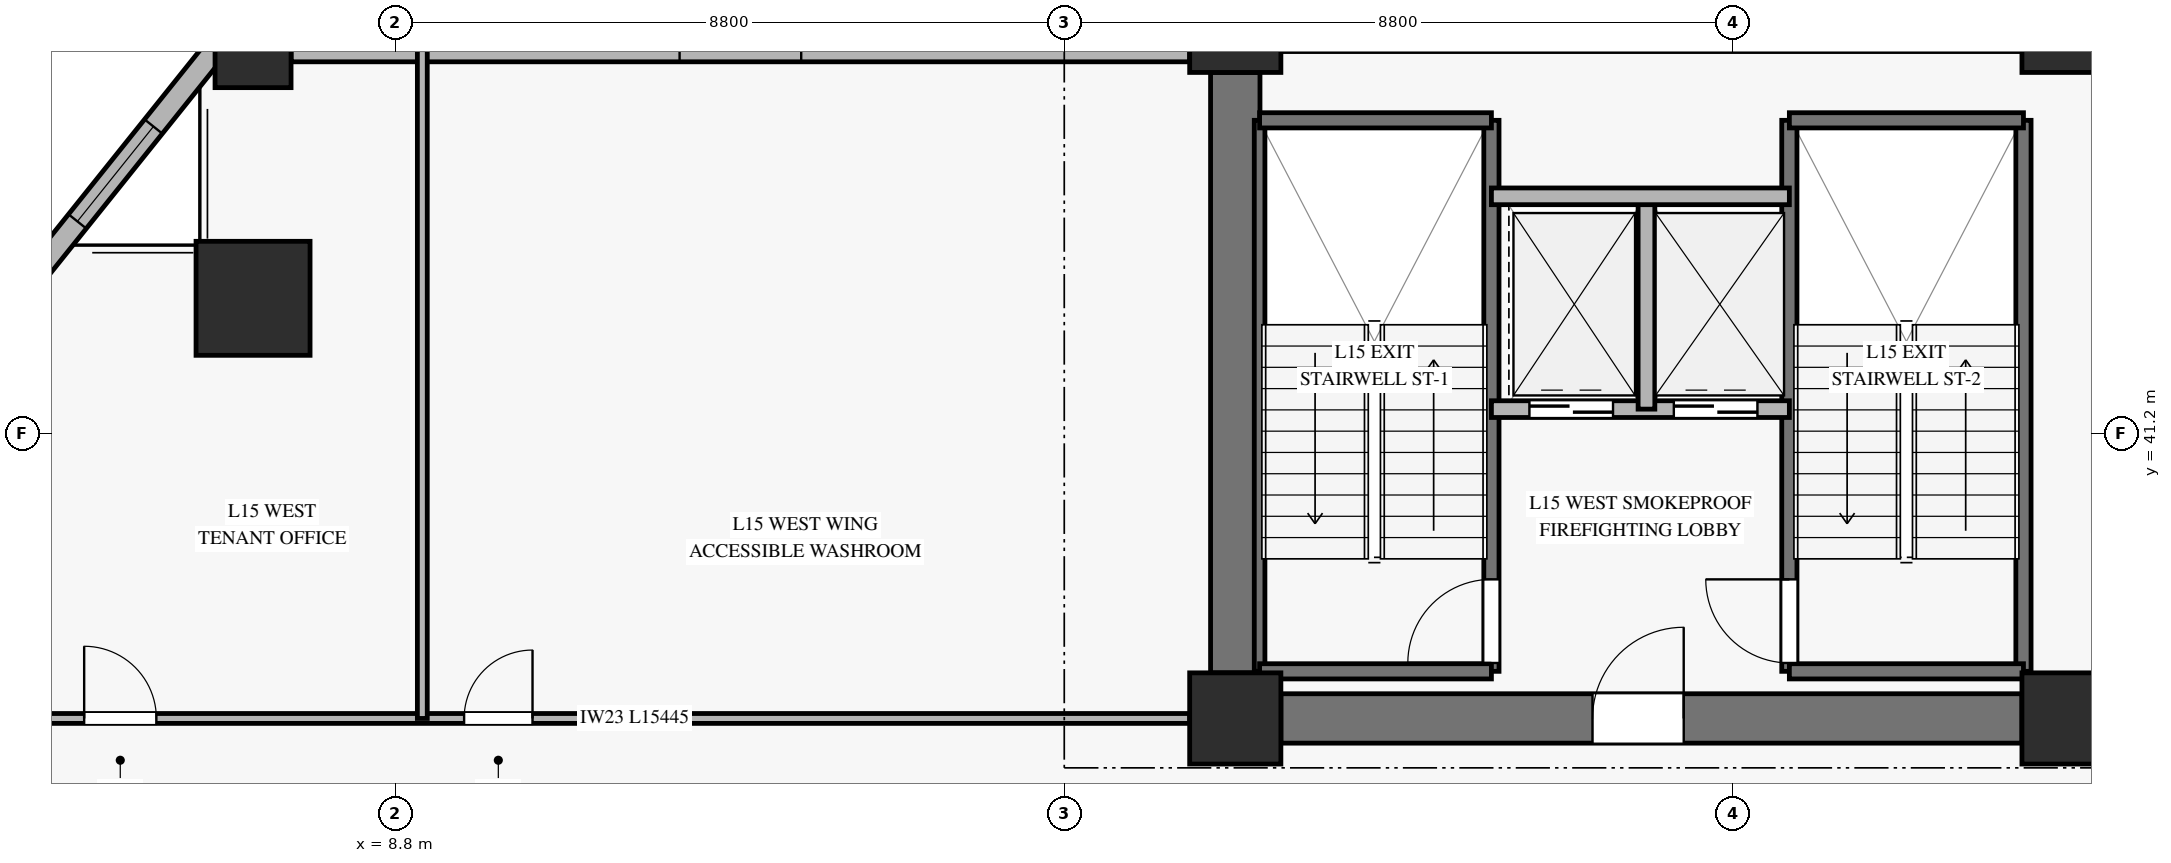
"""IFC4 building model, lengths in metres.
Left out: names, types, materials, properties, quantities, classifications, styles, units other than length and angle.
Written with IfcOpenShell. Run it as: python <this file> out.ifc"""

import sys

from ifc_helpers import new_model, si_unit, direction, frame, frame_2d, origin, origin_2d, place, context, subcontext, project, spatial, rectangle, hollow_rectangle, extrude, source, transform, mapped, element, fill, save


model = new_model("IFC4")
c1 = context("Model", 3, precision=1e-05, world=origin(), true_north=direction((0.0, 1.0)))
c2 = subcontext(c1, "Body", "Model", "MODEL_VIEW")
j1 = project(units=[si_unit("LENGTHUNIT", "METRE"), si_unit("PLANEANGLEUNIT", "RADIAN")], contexts=[c1])
p1 = place(None, origin())
s1 = spatial("IfcSite", under=j1, at=p1, CompositionType="ELEMENT")
p2 = place(p1, origin())
s2 = spatial("IfcBuilding", under=s1, at=p2, CompositionType="ELEMENT")
p3 = place(p2, frame((0.0, 0.0, 61.1)))
s3 = spatial("IfcBuildingStorey", under=s2, at=p3, CompositionType="ELEMENT", Elevation=61.1)
m1 = source(origin(), c2, "Body", "SweptSolid", [
    extrude(rectangle(XDim=1.2, YDim=1.2, at=origin_2d()), origin(), (0.0, 0.0, 1.0), 3.68),
])
for number, where, z_axis, x_axis in (
    (1, (19.85, 37.45, 0.0), (0.0, 0.0, 1.0), (1.0, 0.0, 0.0)),
    (2, (19.85, 46.55, 0.0), (0.0, 0.0, 1.0), (1.0, 0.0, 0.0)),
    (3, (30.8, 37.45, 0.0), (0.0, 0.0, 1.0), (1.0, 0.0, 0.0)),
    (4, (30.8, 46.55, 0.0), (0.0, 0.0, 1.0), (1.0, 0.0, 0.0)),
):
    element("IfcColumn", number, at=place(p3, frame(where, z_axis=z_axis, x_axis=x_axis)), inside=s3, PredefinedType="PILASTER", context=c2, shape_type="MappedRepresentation", body=[
        mapped(m1, transform((0.0, 0.0, 0.0), x_axis=(1.0, 0.0, 0.0), y_axis=(0.0, 1.0, 0.0), z_axis=(0.0, 0.0, 1.0), scale=1.0)),
    ])
p4 = place(p3, frame((20.45, 37.45, 0.0), z_axis=(0.0, 0.0, 1.0), x_axis=(1.0, 0.0, 0.0)))
e5 = element("IfcWall", 5, at=p4, inside=s3, PredefinedType="SHEAR", context=c2, shape_type="SweptSolid", body=[
    extrude(rectangle(XDim=9.75, YDim=0.65, at=frame_2d((4.875, 0.0))), origin(), (0.0, 0.0, 1.0), 3.68),
])
p5 = place(p4, frame((4.1, 0.0, 0.0)))
e6 = element("IfcOpeningElement", 6, at=p5, cuts=e5, PredefinedType="OPENING", context=c2, shape_type="SweptSolid", body=[
    extrude(rectangle(XDim=1.2, YDim=2.15, at=frame_2d((0.6, 1.075))), frame((0.0, 0.335, 0.0), z_axis=(0.0, -1.0, 0.0), x_axis=(1.0, 0.0, 0.0)), (0.0, 0.0, 1.0), 0.67),
])
p6 = place(p3, frame((19.85, 38.05, 0.0), z_axis=(0.0, 0.0, 1.0), x_axis=(0.0, 1.0, 0.0)))
e7 = element("IfcWall", 7, at=p6, inside=s3, PredefinedType="SHEAR", context=c2, shape_type="SweptSolid", body=[
    extrude(rectangle(XDim=7.9, YDim=0.65, at=frame_2d((3.95, 0.0))), origin(), (0.0, 0.0, 1.0), 3.68),
])
m2 = source(origin(), c2, "Body", "SweptSolid", [
    extrude(hollow_rectangle(XDim=1.5, YDim=1.5, WallThickness=0.07, at=origin_2d()), origin(), (0.0, 0.0, 1.0), 3.68),
])
p7 = place(p3, frame((6.927, 42.978, 0.0), z_axis=(0.0, 0.0, 1.0), x_axis=(1.0, 0.0, 0.0)))
e8 = element("IfcColumn", 8, at=p7, inside=s3, PredefinedType="COLUMN", context=c2, shape_type="MappedRepresentation", body=[
    mapped(m2, transform((0.0, 0.0, 0.0), x_axis=(1.0, 0.0, 0.0), y_axis=(0.0, 1.0, 0.0), z_axis=(0.0, 0.0, 1.0), scale=1.0)),
])
m3 = source(origin(), c2, "Body", "SweptSolid", [
    extrude(hollow_rectangle(XDim=1.0, YDim=1.0, WallThickness=0.045, at=origin_2d()), origin(), (0.0, 0.0, 1.0), 3.68),
])
p8 = place(p3, frame((6.927, 46.25, 0.0), z_axis=(0.0, 0.0, 1.0), x_axis=(1.0, 0.0, 0.0)))
e9 = element("IfcColumn", 9, at=p8, inside=s3, PredefinedType="COLUMN", context=c2, shape_type="MappedRepresentation", body=[
    mapped(m3, transform((0.0, 0.0, 0.0), x_axis=(1.0, 0.0, 0.0), y_axis=(0.0, 1.0, 0.0), z_axis=(0.0, 0.0, 1.0), scale=1.0)),
])
p9 = place(p3, frame((7.427, 46.25, 0.0), z_axis=(0.0, 0.0, 1.0), x_axis=(1.0, 0.0, 0.0)))
e10 = element("IfcWall", 10, at=p9, inside=s3, PredefinedType="SOLIDWALL", context=c2, shape_type="SweptSolid", body=[
    extrude(rectangle(XDim=11.823, YDim=0.32, at=frame_2d((5.912, 0.0))), origin(), (0.0, 0.0, 1.0), 3.16),
])
p10 = place(p9, frame((5.112, 0.0, 0.45)))
e11 = element("IfcOpeningElement", 11, at=p10, cuts=e10, PredefinedType="OPENING", context=c2, shape_type="SweptSolid", body=[
    extrude(rectangle(XDim=1.6, YDim=2.0, at=frame_2d((0.8, 1.0))), frame((0.0, 0.17, 0.0), z_axis=(0.0, -1.0, 0.0), x_axis=(1.0, 0.0, 0.0)), (0.0, 0.0, 1.0), 0.34),
])
p11 = place(p3, frame((6.427, 46.25, 0.0), z_axis=(0.0, 0.0, 1.0), x_axis=(-0.625348097159, -0.780345921614, 0.0)))
e12 = element("IfcWall", 12, at=p11, inside=s3, PredefinedType="SOLIDWALL", context=c2, shape_type="SweptSolid", body=[
    extrude(rectangle(XDim=4.193, YDim=0.3, at=frame_2d((2.096, 0.0))), origin(), (0.0, 0.0, 1.0), 3.16),
])
p12 = place(p11, frame((1.296, 0.0, 0.45)))
e13 = element("IfcOpeningElement", 13, at=p12, cuts=e12, PredefinedType="OPENING", context=c2, shape_type="SweptSolid", body=[
    extrude(rectangle(XDim=1.6, YDim=2.0, at=frame_2d((0.8, 1.0))), frame((0.0, 0.16, 0.0), z_axis=(0.0, -1.0, 0.0), x_axis=(1.0, 0.0, 0.0)), (0.0, 0.0, 1.0), 0.32),
])
p13 = place(p3, frame((20.17, 38.07, 0.0), z_axis=(0.0, 0.0, 1.0), x_axis=(0.0, 1.0, 0.0)))
e14 = element("IfcWall", 14, at=p13, inside=s3, PredefinedType="SOLIDWALL", context=c2, shape_type="SweptSolid", body=[
    extrude(rectangle(XDim=7.25, YDim=0.14, at=frame_2d((3.625, 0.0))), origin(), (0.0, 0.0, 1.0), 3.9),
])
p14 = place(p3, frame((23.22, 38.07, 0.0), z_axis=(0.0, 0.0, 1.0), x_axis=(0.0, 1.0, 0.0)))
e15 = element("IfcWall", 15, at=p14, inside=s3, PredefinedType="SOLIDWALL", context=c2, shape_type="SweptSolid", body=[
    extrude(rectangle(XDim=7.25, YDim=0.2, at=frame_2d((3.625, 0.0))), origin(), (0.0, 0.0, 1.0), 3.9),
])
p15 = place(p14, frame((0.11, 0.0, 0.0)))
e16 = element("IfcOpeningElement", 16, at=p15, cuts=e15, PredefinedType="OPENING", context=c2, shape_type="SweptSolid", body=[
    extrude(rectangle(XDim=1.1, YDim=2.15, at=frame_2d((0.55, 1.075))), frame((0.0, 0.11, 0.0), z_axis=(0.0, -1.0, 0.0), x_axis=(1.0, 0.0, 0.0)), (0.0, 0.0, 1.0), 0.22),
])
for number, where, z_axis, x_axis in (
    (17, (20.17, 45.32, 0.0), (0.0, 0.0, 1.0), (1.0, 0.0, 0.0)),
    (18, (20.17, 38.07, 0.0), (0.0, 0.0, 1.0), (1.0, 0.0, 0.0)),
):
    element("IfcWall", number, at=place(p3, frame(where, z_axis=z_axis, x_axis=x_axis)), inside=s3, PredefinedType="SOLIDWALL", context=c2, shape_type="SweptSolid", body=[
        extrude(rectangle(XDim=3.05, YDim=0.2, at=frame_2d((1.525, 0.0))), origin(), (0.0, 0.0, 1.0), 3.9),
    ])
p16 = place(p3, frame((27.14, 38.07, 0.0), z_axis=(0.0, 0.0, 1.0), x_axis=(0.0, 1.0, 0.0)))
e19 = element("IfcWall", 19, at=p16, inside=s3, PredefinedType="SOLIDWALL", context=c2, shape_type="SweptSolid", body=[
    extrude(rectangle(XDim=7.25, YDim=0.2, at=frame_2d((3.625, 0.0))), origin(), (0.0, 0.0, 1.0), 3.9),
])
p17 = place(p16, frame((0.11, 0.0, 0.0)))
e20 = element("IfcOpeningElement", 20, at=p17, cuts=e19, PredefinedType="OPENING", context=c2, shape_type="SweptSolid", body=[
    extrude(rectangle(XDim=1.1, YDim=2.15, at=frame_2d((0.55, 1.075))), frame((0.0, 0.11, 0.0), z_axis=(0.0, -1.0, 0.0), x_axis=(1.0, 0.0, 0.0)), (0.0, 0.0, 1.0), 0.22),
])
p18 = place(p3, frame((30.22, 38.07, 0.0), z_axis=(0.0, 0.0, 1.0), x_axis=(0.0, 1.0, 0.0)))
e21 = element("IfcWall", 21, at=p18, inside=s3, PredefinedType="SOLIDWALL", context=c2, shape_type="SweptSolid", body=[
    extrude(rectangle(XDim=7.25, YDim=0.2, at=frame_2d((3.625, 0.0))), origin(), (0.0, 0.0, 1.0), 3.9),
])
for number, where, z_axis, x_axis in (
    (22, (27.14, 45.32, 0.0), (0.0, 0.0, 1.0), (1.0, 0.0, 0.0)),
    (23, (27.14, 38.07, 0.0), (0.0, 0.0, 1.0), (1.0, 0.0, 0.0)),
):
    element("IfcWall", number, at=place(p3, frame(where, z_axis=z_axis, x_axis=x_axis)), inside=s3, PredefinedType="SOLIDWALL", context=c2, shape_type="SweptSolid", body=[
        extrude(rectangle(XDim=3.08, YDim=0.2, at=frame_2d((1.54, 0.0))), origin(), (0.0, 0.0, 1.0), 3.9),
    ])
p19 = place(p3, frame((23.22, 41.52, 0.0), z_axis=(0.0, 0.0, 1.0), x_axis=(1.0, 0.0, 0.0)))
e24 = element("IfcWall", 24, at=p19, inside=s3, PredefinedType="SOLIDWALL", context=c2, shape_type="SweptSolid", body=[
    extrude(rectangle(XDim=3.92, YDim=0.22, at=frame_2d((1.96, 0.0))), origin(), (0.0, 0.0, 1.0), 3.68),
])
p20 = place(p19, frame((0.5, 0.0, 0.0)))
e25 = element("IfcOpeningElement", 25, at=p20, cuts=e24, PredefinedType="OPENING", context=c2, shape_type="SweptSolid", body=[
    extrude(rectangle(XDim=1.1, YDim=2.2, at=frame_2d((0.55, 1.1))), frame((0.0, 0.12, 0.0), z_axis=(0.0, -1.0, 0.0), x_axis=(1.0, 0.0, 0.0)), (0.0, 0.0, 1.0), 0.24),
])
p21 = place(p19, frame((2.4, 0.0, 0.0)))
e26 = element("IfcOpeningElement", 26, at=p21, cuts=e24, PredefinedType="OPENING", context=c2, shape_type="SweptSolid", body=[
    extrude(rectangle(XDim=1.1, YDim=2.2, at=frame_2d((0.55, 1.1))), frame((0.0, 0.12, 0.0), z_axis=(0.0, -1.0, 0.0), x_axis=(1.0, 0.0, 0.0)), (0.0, 0.0, 1.0), 0.24),
])
p22 = place(p3, frame((25.26, 41.52, 0.0), z_axis=(0.0, 0.0, 1.0), x_axis=(0.0, 1.0, 0.0)))
e27 = element("IfcWall", 27, at=p22, inside=s3, PredefinedType="SOLIDWALL", context=c2, shape_type="SweptSolid", body=[
    extrude(rectangle(XDim=2.8, YDim=0.22, at=frame_2d((1.4, 0.0))), origin(), (0.0, 0.0, 1.0), 3.68),
])
p23 = place(p3, frame((23.22, 44.32, 0.0), z_axis=(0.0, 0.0, 1.0), x_axis=(1.0, 0.0, 0.0)))
e28 = element("IfcWall", 28, at=p23, inside=s3, PredefinedType="SOLIDWALL", context=c2, shape_type="SweptSolid", body=[
    extrude(rectangle(XDim=3.92, YDim=0.22, at=frame_2d((1.96, 0.0))), origin(), (0.0, 0.0, 1.0), 3.68),
])
p24 = place(p3, frame((3.805, 37.45, 0.0), z_axis=(0.0, 0.0, 1.0), x_axis=(1.0, 0.0, 0.0)))
e29 = element("IfcWall", 29, at=p24, inside=s3, PredefinedType="PARTITIONING", context=c2, shape_type="SweptSolid", body=[
    extrude(rectangle(XDim=15.445, YDim=0.13, at=frame_2d((7.723, 0.0))), origin(), (0.0, 0.0, 1.0), 3.165),
])
p25 = place(p24, frame((0.9, 0.0, 0.0)))
e30 = element("IfcOpeningElement", 30, at=p25, cuts=e29, PredefinedType="OPENING", context=c2, shape_type="SweptSolid", body=[
    extrude(rectangle(XDim=0.95, YDim=2.1, at=frame_2d((0.475, 1.05))), frame((0.0, 0.075, 0.0), z_axis=(0.0, -1.0, 0.0), x_axis=(1.0, 0.0, 0.0)), (0.0, 0.0, 1.0), 0.15),
])
p26 = place(p24, frame((5.899, 0.0, 0.0)))
e31 = element("IfcOpeningElement", 31, at=p26, cuts=e29, PredefinedType="OPENING", context=c2, shape_type="SweptSolid", body=[
    extrude(rectangle(XDim=0.9, YDim=2.1, at=frame_2d((0.45, 1.05))), frame((0.0, 0.075, 0.0), z_axis=(0.0, -1.0, 0.0), x_axis=(1.0, 0.0, 0.0)), (0.0, 0.0, 1.0), 0.15),
])
p27 = place(p3, frame((9.154, 37.45, 0.0), z_axis=(0.0, 0.0, 1.0), x_axis=(0.0, 1.0, 0.0)))
e32 = element("IfcWall", 32, at=p27, inside=s3, PredefinedType="PARTITIONING", context=c2, shape_type="SweptSolid", body=[
    extrude(rectangle(XDim=8.8, YDim=0.13, at=frame_2d((4.4, 0.0))), origin(), (0.0, 0.0, 1.0), 3.68),
])
m4 = source(origin(), c2, "Body", "SweptSolid", [
    extrude(rectangle(XDim=1.6, YDim=2.0, at=frame_2d((0.8, 1.0))), frame((0.0, 0.03, 0.0), z_axis=(0.0, -1.0, 0.0), x_axis=(1.0, 0.0, 0.0)), (0.0, 0.0, 1.0), 0.06),
])
p28 = place(p12, origin())
e33 = element("IfcWindow", 33, at=p28, inside=s3, PartitioningType="SINGLE_PANEL", PredefinedType="WINDOW", context=c2, shape_type="MappedRepresentation", body=[
    mapped(m4, transform((0.0, 0.0, 0.0), x_axis=(1.0, 0.0, 0.0), y_axis=(0.0, 1.0, 0.0), z_axis=(0.0, 0.0, 1.0), scale=1.0)),
])
fill(e13, e33)
m5 = source(origin(), c2, "Body", "SweptSolid", [
    extrude(rectangle(XDim=1.1, YDim=2.15, at=frame_2d((0.55, 1.075))), frame((0.0, 0.025, 0.0), z_axis=(0.0, -1.0, 0.0), x_axis=(1.0, 0.0, 0.0)), (0.0, 0.0, 1.0), 0.05),
])
p29 = place(p15, origin())
e34 = element("IfcDoor", 34, at=p29, inside=s3, OperationType="SINGLE_SWING_LEFT", PredefinedType="DOOR", context=c2, shape_type="MappedRepresentation", body=[
    mapped(m5, transform((0.0, 0.0, 0.0), x_axis=(1.0, 0.0, 0.0), y_axis=(0.0, 1.0, 0.0), z_axis=(0.0, 0.0, 1.0), scale=1.0)),
])
fill(e16, e34)
p30 = place(p17, origin())
e35 = element("IfcDoor", 35, at=p30, inside=s3, OperationType="SINGLE_SWING_RIGHT", PredefinedType="DOOR", context=c2, shape_type="MappedRepresentation", body=[
    mapped(m5, transform((0.0, 0.0, 0.0), x_axis=(1.0, 0.0, 0.0), y_axis=(0.0, 1.0, 0.0), z_axis=(0.0, 0.0, 1.0), scale=1.0)),
])
fill(e20, e35)
m6 = source(origin(), c2, "Body", "SweptSolid", [
    extrude(rectangle(XDim=1.1, YDim=2.2, at=frame_2d((0.55, 1.1))), frame((0.0, 0.025, 0.0), z_axis=(0.0, -1.0, 0.0), x_axis=(1.0, 0.0, 0.0)), (0.0, 0.0, 1.0), 0.05),
])
p31 = place(p20, origin())
e36 = element("IfcDoor", 36, at=p31, inside=s3, OperationType="SLIDING_TO_LEFT", PredefinedType="DOOR", context=c2, shape_type="MappedRepresentation", body=[
    mapped(m6, transform((0.0, 0.0, 0.0), x_axis=(1.0, 0.0, 0.0), y_axis=(0.0, 1.0, 0.0), z_axis=(0.0, 0.0, 1.0), scale=1.0)),
])
fill(e25, e36)
p32 = place(p21, origin())
e37 = element("IfcDoor", 37, at=p32, inside=s3, OperationType="SLIDING_TO_LEFT", PredefinedType="DOOR", context=c2, shape_type="MappedRepresentation", body=[
    mapped(m6, transform((0.0, 0.0, 0.0), x_axis=(1.0, 0.0, 0.0), y_axis=(0.0, 1.0, 0.0), z_axis=(0.0, 0.0, 1.0), scale=1.0)),
])
fill(e26, e37)
m7 = source(origin(), c2, "Body", "SweptSolid", [
    extrude(rectangle(XDim=1.2, YDim=2.15, at=frame_2d((0.6, 1.075))), frame((0.0, 0.025, 0.0), z_axis=(0.0, -1.0, 0.0), x_axis=(1.0, 0.0, 0.0)), (0.0, 0.0, 1.0), 0.05),
])
p33 = place(p5, origin())
e38 = element("IfcDoor", 38, at=p33, inside=s3, OperationType="SINGLE_SWING_RIGHT", PredefinedType="DOOR", context=c2, shape_type="MappedRepresentation", body=[
    mapped(m7, transform((0.0, 0.0, 0.0), x_axis=(1.0, 0.0, 0.0), y_axis=(0.0, 1.0, 0.0), z_axis=(0.0, 0.0, 1.0), scale=1.0)),
])
fill(e6, e38)
m8 = source(origin(), c2, "Body", "SweptSolid", [
    extrude(rectangle(XDim=0.95, YDim=2.1, at=frame_2d((0.475, 1.05))), frame((0.0, 0.025, 0.0), z_axis=(0.0, -1.0, 0.0), x_axis=(1.0, 0.0, 0.0)), (0.0, 0.0, 1.0), 0.05),
])
p34 = place(p25, origin())
e39 = element("IfcDoor", 39, at=p34, inside=s3, OperationType="SINGLE_SWING_LEFT", PredefinedType="DOOR", context=c2, shape_type="MappedRepresentation", body=[
    mapped(m8, transform((0.0, 0.0, 0.0), x_axis=(1.0, 0.0, 0.0), y_axis=(0.0, 1.0, 0.0), z_axis=(0.0, 0.0, 1.0), scale=1.0)),
])
fill(e30, e39)
m9 = source(origin(), c2, "Body", "SweptSolid", [
    extrude(rectangle(XDim=0.9, YDim=2.1, at=frame_2d((0.45, 1.05))), frame((0.0, 0.025, 0.0), z_axis=(0.0, -1.0, 0.0), x_axis=(1.0, 0.0, 0.0)), (0.0, 0.0, 1.0), 0.05),
])
p35 = place(p26, origin())
e40 = element("IfcDoor", 40, at=p35, inside=s3, OperationType="SINGLE_SWING_RIGHT", PredefinedType="DOOR", context=c2, shape_type="MappedRepresentation", body=[
    mapped(m9, transform((0.0, 0.0, 0.0), x_axis=(1.0, 0.0, 0.0), y_axis=(0.0, 1.0, 0.0), z_axis=(0.0, 0.0, 1.0), scale=1.0)),
])
fill(e31, e40)
save(model, sys.argv[1])
